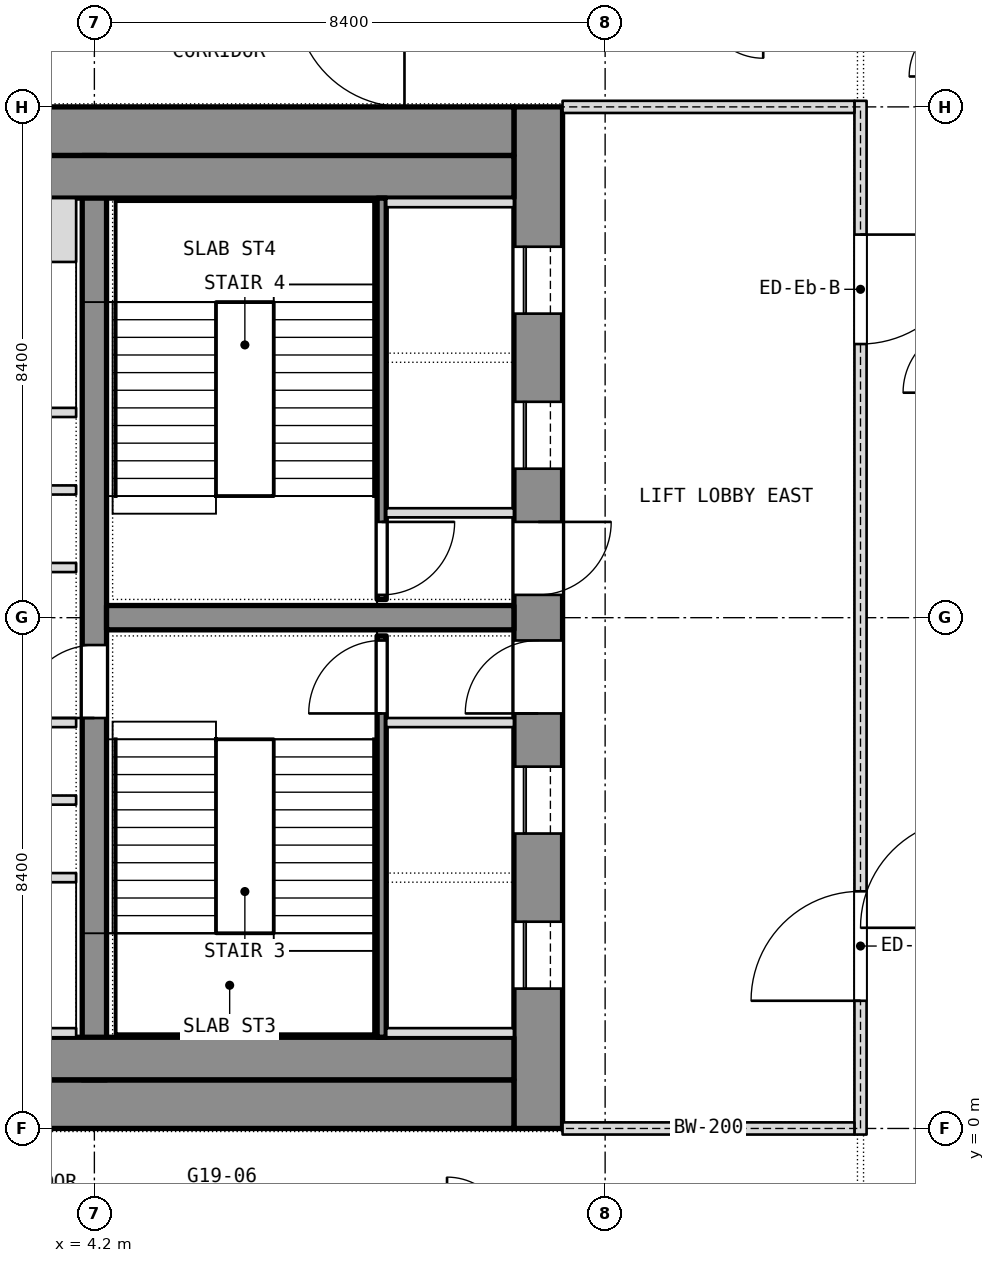
"""IFC4 building model, lengths in metres.
Left out: names, types, materials, properties, quantities, classifications, styles, units other than length and angle.
Written with IfcOpenShell. Run it as: python <this file> out.ifc"""

import sys

from ifc_helpers import new_model, si_unit, direction, frame, frame_2d, origin, place, context, subcontext, project, spatial, rectangle, extrude, element, fill, save


model = new_model("IFC4")
c1 = context("Model", 3, precision=1e-05, world=origin(), true_north=direction((0.0, 1.0)))
c2 = subcontext(c1, "Body", "Model", "MODEL_VIEW")
j1 = project(units=[si_unit("LENGTHUNIT", "METRE"), si_unit("PLANEANGLEUNIT", "RADIAN")], contexts=[c1])
p1 = place(None, origin())
s1 = spatial("IfcSite", under=j1, at=p1, CompositionType="ELEMENT")
p2 = place(p1, origin())
s2 = spatial("IfcBuilding", under=s1, at=p2, CompositionType="ELEMENT")
p3 = place(p2, frame((0.0, 0.0, 227.3)))
s3 = spatial("IfcBuildingStorey", under=s2, at=p3, CompositionType="ELEMENT", Elevation=227.3)
p4 = place(p3, frame((11.5, 0.0, 0.0), z_axis=(0.0, 0.0, 1.0), x_axis=(0.0, 1.0, 0.0)))
e1 = element("IfcWall", 1, at=p4, inside=s3, PredefinedType="SHEAR", context=c2, shape_type="SweptSolid", body=[
    extrude(rectangle(XDim=16.8, YDim=0.8, at=frame_2d((8.4, 0.0))), origin(), (0.0, 0.0, 1.0), 3.6),
])
p5 = place(p4, frame((2.3, 0.0, 0.0)))
e2 = element("IfcOpeningElement", 2, at=p5, cuts=e1, PredefinedType="OPENING", context=c2, shape_type="SweptSolid", body=[
    extrude(rectangle(XDim=1.1, YDim=2.1, at=frame_2d((0.55, 1.05))), frame((0.0, 0.4, 0.0), z_axis=(0.0, -1.0, 0.0), x_axis=(1.0, 0.0, 0.0)), (0.0, 0.0, 1.0), 0.8),
])
p6 = place(p4, frame((4.85, 0.0, 0.0)))
e3 = element("IfcOpeningElement", 3, at=p6, cuts=e1, PredefinedType="OPENING", context=c2, shape_type="SweptSolid", body=[
    extrude(rectangle(XDim=1.1, YDim=2.1, at=frame_2d((0.55, 1.05))), frame((0.0, 0.4, 0.0), z_axis=(0.0, -1.0, 0.0), x_axis=(1.0, 0.0, 0.0)), (0.0, 0.0, 1.0), 0.8),
])
p7 = place(p4, frame((6.825, 0.0, 0.0)))
e4 = element("IfcOpeningElement", 4, at=p7, cuts=e1, PredefinedType="OPENING", context=c2, shape_type="SweptSolid", body=[
    extrude(rectangle(XDim=1.2, YDim=2.1, at=frame_2d((0.6, 1.05))), frame((0.0, 0.4, 0.0), z_axis=(0.0, -1.0, 0.0), x_axis=(1.0, 0.0, 0.0)), (0.0, 0.0, 1.0), 0.8),
])
p8 = place(p4, frame((13.4, 0.0, 0.0)))
e5 = element("IfcOpeningElement", 5, at=p8, cuts=e1, PredefinedType="OPENING", context=c2, shape_type="SweptSolid", body=[
    extrude(rectangle(XDim=1.1, YDim=2.1, at=frame_2d((0.55, 1.05))), frame((0.0, 0.4, 0.0), z_axis=(0.0, -1.0, 0.0), x_axis=(1.0, 0.0, 0.0)), (0.0, 0.0, 1.0), 0.8),
])
p9 = place(p4, frame((10.85, 0.0, 0.0)))
e6 = element("IfcOpeningElement", 6, at=p9, cuts=e1, PredefinedType="OPENING", context=c2, shape_type="SweptSolid", body=[
    extrude(rectangle(XDim=1.1, YDim=2.1, at=frame_2d((0.55, 1.05))), frame((0.0, 0.4, 0.0), z_axis=(0.0, -1.0, 0.0), x_axis=(1.0, 0.0, 0.0)), (0.0, 0.0, 1.0), 0.8),
])
p10 = place(p4, frame((8.775, 0.0, 0.0)))
e7 = element("IfcOpeningElement", 7, at=p10, cuts=e1, PredefinedType="OPENING", context=c2, shape_type="SweptSolid", body=[
    extrude(rectangle(XDim=1.2, YDim=2.1, at=frame_2d((0.6, 1.05))), frame((0.0, 0.4, 0.0), z_axis=(0.0, -1.0, 0.0), x_axis=(1.0, 0.0, 0.0)), (0.0, 0.0, 1.0), 0.8),
])
for number, where, z_axis, x_axis in (
    (8, (-11.1, 0.4, 0.0), (0.0, 0.0, 1.0), (1.0, 0.0, 0.0)),
    (9, (-11.1, 16.4, 0.0), (0.0, 0.0, 1.0), (1.0, 0.0, 0.0)),
):
    element("IfcWall", number, at=place(p3, frame(where, z_axis=z_axis, x_axis=x_axis)), inside=s3, PredefinedType="SHEAR", context=c2, shape_type="SweptSolid", body=[
        extrude(rectangle(XDim=22.2, YDim=0.8, at=frame_2d((11.1, 0.0))), origin(), (0.0, 0.0, 1.0), 3.6),
    ])
p11 = place(p3, frame((4.2, 0.8, 0.0), z_axis=(0.0, 0.0, 1.0), x_axis=(0.0, 1.0, 0.0)))
e10 = element("IfcWall", 10, at=p11, inside=s3, PredefinedType="SHEAR", context=c2, shape_type="SweptSolid", body=[
    extrude(rectangle(XDim=15.2, YDim=0.4, at=frame_2d((7.6, 0.0))), origin(), (0.0, 0.0, 1.0), 3.6),
])
p12 = place(p11, frame((5.95, 0.0, 0.0)))
e11 = element("IfcOpeningElement", 11, at=p12, cuts=e10, PredefinedType="OPENING", context=c2, shape_type="SweptSolid", body=[
    extrude(rectangle(XDim=1.2, YDim=2.1, at=frame_2d((0.6, 1.05))), frame((0.0, 0.2, 0.0), z_axis=(0.0, -1.0, 0.0), x_axis=(1.0, 0.0, 0.0)), (0.0, 0.0, 1.0), 0.4),
])
p13 = place(p3, frame((4.4, 8.4, 0.0), z_axis=(0.0, 0.0, 1.0), x_axis=(1.0, 0.0, 0.0)))
e12 = element("IfcWall", 12, at=p13, inside=s3, PredefinedType="SHEAR", context=c2, shape_type="SweptSolid", body=[
    extrude(rectangle(XDim=6.7, YDim=0.4, at=frame_2d((3.35, 0.0))), origin(), (0.0, 0.0, 1.0), 3.6),
])
for number, where, z_axis, x_axis in (
    (13, (-11.1, 1.15, 0.0), (0.0, 0.0, 1.0), (1.0, 0.0, 0.0)),
    (14, (-11.1, 15.65, 0.0), (0.0, 0.0, 1.0), (1.0, 0.0, 0.0)),
):
    element("IfcWall", number, at=place(p3, frame(where, z_axis=z_axis, x_axis=x_axis)), inside=s3, PredefinedType="PARTITIONING", context=c2, shape_type="SweptSolid", body=[
        extrude(rectangle(XDim=22.2, YDim=0.7, at=frame_2d((11.1, 0.0))), origin(), (0.0, 0.0, 1.0), 3.34),
    ])
p14 = place(p3, frame((8.925, 1.5, 0.0), z_axis=(0.0, 0.0, 1.0), x_axis=(0.0, 1.0, 0.0)))
e15 = element("IfcWall", 15, at=p14, inside=s3, PredefinedType="SHEAR", context=c2, shape_type="SweptSolid", body=[
    extrude(rectangle(XDim=6.6, YDim=0.15, at=frame_2d((3.3, 0.0))), origin(), (0.0, 0.0, 1.0), 3.34),
])
p15 = place(p14, frame((5.325, 0.0, 0.0)))
e16 = element("IfcOpeningElement", 16, at=p15, cuts=e15, PredefinedType="OPENING", context=c2, shape_type="SweptSolid", body=[
    extrude(rectangle(XDim=1.2, YDim=2.1, at=frame_2d((0.6, 1.05))), frame((0.0, 0.075, 0.0), z_axis=(0.0, -1.0, 0.0), x_axis=(1.0, 0.0, 0.0)), (0.0, 0.0, 1.0), 0.15),
])
for number, where, z_axis, x_axis in (
    (17, (9.0, 6.675, 0.0), (0.0, 0.0, 1.0), (1.0, 0.0, 0.0)),
    (18, (9.0, 1.575, 0.0), (0.0, 0.0, 1.0), (1.0, 0.0, 0.0)),
):
    element("IfcWall", number, at=place(p3, frame(where, z_axis=z_axis, x_axis=x_axis)), inside=s3, PredefinedType="SHEAR", context=c2, shape_type="SweptSolid", body=[
        extrude(rectangle(XDim=2.1, YDim=0.15, at=frame_2d((1.05, 0.0))), origin(), (0.0, 0.0, 1.0), 3.6),
    ])
p16 = place(p3, frame((8.925, 8.7, 0.0), z_axis=(0.0, 0.0, 1.0), x_axis=(0.0, 1.0, 0.0)))
e19 = element("IfcWall", 19, at=p16, inside=s3, PredefinedType="SHEAR", context=c2, shape_type="SweptSolid", body=[
    extrude(rectangle(XDim=6.6, YDim=0.15, at=frame_2d((3.3, 0.0))), origin(), (0.0, 0.0, 1.0), 3.34),
])
p17 = place(p16, frame((0.075, 0.0, 0.0)))
e20 = element("IfcOpeningElement", 20, at=p17, cuts=e19, PredefinedType="OPENING", context=c2, shape_type="SweptSolid", body=[
    extrude(rectangle(XDim=1.2, YDim=2.1, at=frame_2d((0.6, 1.05))), frame((0.0, 0.075, 0.0), z_axis=(0.0, -1.0, 0.0), x_axis=(1.0, 0.0, 0.0)), (0.0, 0.0, 1.0), 0.15),
])
for number, where, z_axis, x_axis in (
    (21, (9.0, 10.125, 0.0), (0.0, 0.0, 1.0), (1.0, 0.0, 0.0)),
    (22, (9.0, 15.225, 0.0), (0.0, 0.0, 1.0), (1.0, 0.0, 0.0)),
):
    element("IfcWall", number, at=place(p3, frame(where, z_axis=z_axis, x_axis=x_axis)), inside=s3, PredefinedType="SHEAR", context=c2, shape_type="SweptSolid", body=[
        extrude(rectangle(XDim=2.1, YDim=0.15, at=frame_2d((1.05, 0.0))), origin(), (0.0, 0.0, 1.0), 3.6),
    ])
p18 = place(p3, frame((-3.9, 4.125, 0.0), z_axis=(0.0, 0.0, 1.0), x_axis=(1.0, 0.0, 0.0)))
e23 = element("IfcWall", 23, at=p18, inside=s3, PredefinedType="PARTITIONING", context=c2, shape_type="SweptSolid", body=[
    extrude(rectangle(XDim=7.8, YDim=0.15, at=frame_2d((3.9, 0.0))), origin(), (0.0, 0.0, 1.0), 3.34),
])
p19 = place(p18, frame((3.75, 0.0, 0.0)))
e24 = element("IfcOpeningElement", 24, at=p19, cuts=e23, PredefinedType="OPENING", context=c2, shape_type="SweptSolid", body=[
    extrude(rectangle(XDim=1.2, YDim=2.1, at=frame_2d((0.6, 1.05))), frame((0.0, 0.075, 0.0), z_axis=(0.0, -1.0, 0.0), x_axis=(1.0, 0.0, 0.0)), (0.0, 0.0, 1.0), 0.15),
])
p20 = place(p3, frame((-3.9, 11.775, 0.0), z_axis=(0.0, 0.0, 1.0), x_axis=(1.0, 0.0, 0.0)))
e25 = element("IfcWall", 25, at=p20, inside=s3, PredefinedType="PARTITIONING", context=c2, shape_type="SweptSolid", body=[
    extrude(rectangle(XDim=7.8, YDim=0.15, at=frame_2d((3.9, 0.0))), origin(), (0.0, 0.0, 1.0), 3.34),
])
p21 = place(p20, frame((3.3, 0.0, 0.0)))
e26 = element("IfcOpeningElement", 26, at=p21, cuts=e25, PredefinedType="OPENING", context=c2, shape_type="SweptSolid", body=[
    extrude(rectangle(XDim=1.2, YDim=2.1, at=frame_2d((0.6, 1.05))), frame((0.0, 0.075, 0.0), z_axis=(0.0, -1.0, 0.0), x_axis=(1.0, 0.0, 0.0)), (0.0, 0.0, 1.0), 0.15),
])
p22 = place(p3, frame((1.65, 1.575, 0.0), z_axis=(0.0, 0.0, 1.0), x_axis=(1.0, 0.0, 0.0)))
e27 = element("IfcWall", 27, at=p22, inside=s3, PredefinedType="SHEAR", context=c2, shape_type="SweptSolid", body=[
    extrude(rectangle(XDim=2.25, YDim=0.15, at=frame_2d((1.125, 0.0))), origin(), (0.0, 0.0, 1.0), 3.6),
])
p23 = place(p3, frame((1.65, 14.775, 0.0), z_axis=(0.0, 0.0, 1.0), x_axis=(1.0, 0.0, 0.0)))
e28 = element("IfcWall", 28, at=p23, inside=s3, PredefinedType="SHEAR", context=c2, shape_type="SweptSolid", body=[
    extrude(rectangle(XDim=2.25, YDim=1.05, at=frame_2d((1.125, 0.0))), origin(), (0.0, 0.0, 1.0), 3.6),
])
for number, where, z_axis, x_axis in (
    (29, (1.65, 6.675, 0.0), (0.0, 0.0, 1.0), (1.0, 0.0, 0.0)),
    (30, (1.65, 9.225, 0.0), (0.0, 0.0, 1.0), (1.0, 0.0, 0.0)),
):
    element("IfcWall", number, at=place(p3, frame(where, z_axis=z_axis, x_axis=x_axis)), inside=s3, PredefinedType="PARTITIONING", context=c2, shape_type="SweptSolid", body=[
        extrude(rectangle(XDim=2.25, YDim=0.15, at=frame_2d((1.125, 0.0))), origin(), (0.0, 0.0, 1.0), 3.34),
    ])
for number, where, z_axis, x_axis in (
    (31, (1.8, 5.4, 0.0), (0.0, 0.0, 1.0), (1.0, 0.0, 0.0)),
    (32, (1.8, 10.5, 0.0), (0.0, 0.0, 1.0), (1.0, 0.0, 0.0)),
):
    element("IfcWall", number, at=place(p3, frame(where, z_axis=z_axis, x_axis=x_axis)), inside=s3, PredefinedType="PARTITIONING", context=c2, shape_type="SweptSolid", body=[
        extrude(rectangle(XDim=2.1, YDim=0.15, at=frame_2d((1.05, 0.0))), origin(), (0.0, 0.0, 1.0), 3.34),
    ])
p24 = place(p3, frame((16.8, -0.1, 0.0), z_axis=(0.0, 0.0, 1.0), x_axis=(0.0, 1.0, 0.0)))
e33 = element("IfcWall", 33, at=p24, inside=s3, PredefinedType="PARTITIONING", context=c2, shape_type="SweptSolid", body=[
    extrude(rectangle(XDim=17.0, YDim=0.2, at=frame_2d((8.5, 0.0))), origin(), (0.0, 0.0, 1.0), 3.34),
])
p25 = place(p24, frame((2.2, 0.0, 0.0)))
e34 = element("IfcOpeningElement", 34, at=p25, cuts=e33, PredefinedType="OPENING", context=c2, shape_type="SweptSolid", body=[
    extrude(rectangle(XDim=1.8, YDim=2.1, at=frame_2d((0.9, 1.05))), frame((0.0, 0.1, 0.0), z_axis=(0.0, -1.0, 0.0), x_axis=(1.0, 0.0, 0.0)), (0.0, 0.0, 1.0), 0.2),
])
p26 = place(p24, frame((13.0, 0.0, 0.0)))
e35 = element("IfcOpeningElement", 35, at=p26, cuts=e33, PredefinedType="OPENING", context=c2, shape_type="SweptSolid", body=[
    extrude(rectangle(XDim=1.8, YDim=2.1, at=frame_2d((0.9, 1.05))), frame((0.0, 0.1, 0.0), z_axis=(0.0, -1.0, 0.0), x_axis=(1.0, 0.0, 0.0)), (0.0, 0.0, 1.0), 0.2),
])
for number, where, z_axis, x_axis in (
    (36, (11.9, 0.0, 0.0), (0.0, 0.0, 1.0), (1.0, 0.0, 0.0)),
    (37, (11.9, 16.8, 0.0), (0.0, 0.0, 1.0), (1.0, 0.0, 0.0)),
):
    element("IfcWall", number, at=place(p3, frame(where, z_axis=z_axis, x_axis=x_axis)), inside=s3, PredefinedType="PARTITIONING", context=c2, shape_type="SweptSolid", body=[
        extrude(rectangle(XDim=4.8, YDim=0.2, at=frame_2d((2.4, 0.0))), origin(), (0.0, 0.0, 1.0), 2.94),
    ])
p27 = place(p5, origin())
e38 = element("IfcDoor", 38, at=p27, inside=s3, OperationType="SLIDING_TO_LEFT", PredefinedType="DOOR", context=c2, shape_type="SweptSolid", body=[
    extrude(rectangle(XDim=1.1, YDim=2.1, at=frame_2d((0.55, 1.05))), frame((0.0, 0.025, 0.0), z_axis=(0.0, -1.0, 0.0), x_axis=(1.0, 0.0, 0.0)), (0.0, 0.0, 1.0), 0.05),
])
fill(e2, e38)
p28 = place(p6, origin())
e39 = element("IfcDoor", 39, at=p28, inside=s3, OperationType="SLIDING_TO_LEFT", PredefinedType="DOOR", context=c2, shape_type="SweptSolid", body=[
    extrude(rectangle(XDim=1.1, YDim=2.1, at=frame_2d((0.55, 1.05))), frame((0.0, 0.025, 0.0), z_axis=(0.0, -1.0, 0.0), x_axis=(1.0, 0.0, 0.0)), (0.0, 0.0, 1.0), 0.05),
])
fill(e3, e39)
p29 = place(p7, origin())
e40 = element("IfcDoor", 40, at=p29, inside=s3, OperationType="SINGLE_SWING_LEFT", PredefinedType="DOOR", context=c2, shape_type="SweptSolid", body=[
    extrude(rectangle(XDim=1.2, YDim=2.1, at=frame_2d((0.6, 1.05))), frame((0.0, 0.025, 0.0), z_axis=(0.0, -1.0, 0.0), x_axis=(1.0, 0.0, 0.0)), (0.0, 0.0, 1.0), 0.05),
])
fill(e4, e40)
p30 = place(p15, origin())
e41 = element("IfcDoor", 41, at=p30, inside=s3, OperationType="SINGLE_SWING_LEFT", PredefinedType="DOOR", context=c2, shape_type="SweptSolid", body=[
    extrude(rectangle(XDim=1.2, YDim=2.1, at=frame_2d((0.6, 1.05))), frame((0.0, 0.025, 0.0), z_axis=(0.0, -1.0, 0.0), x_axis=(1.0, 0.0, 0.0)), (0.0, 0.0, 1.0), 0.05),
])
fill(e16, e41)
p31 = place(p8, origin())
e42 = element("IfcDoor", 42, at=p31, inside=s3, OperationType="SLIDING_TO_LEFT", PredefinedType="DOOR", context=c2, shape_type="SweptSolid", body=[
    extrude(rectangle(XDim=1.1, YDim=2.1, at=frame_2d((0.55, 1.05))), frame((0.0, 0.025, 0.0), z_axis=(0.0, -1.0, 0.0), x_axis=(1.0, 0.0, 0.0)), (0.0, 0.0, 1.0), 0.05),
])
fill(e5, e42)
p32 = place(p9, origin())
e43 = element("IfcDoor", 43, at=p32, inside=s3, OperationType="SLIDING_TO_LEFT", PredefinedType="DOOR", context=c2, shape_type="SweptSolid", body=[
    extrude(rectangle(XDim=1.1, YDim=2.1, at=frame_2d((0.55, 1.05))), frame((0.0, 0.025, 0.0), z_axis=(0.0, -1.0, 0.0), x_axis=(1.0, 0.0, 0.0)), (0.0, 0.0, 1.0), 0.05),
])
fill(e6, e43)
p33 = place(p10, origin())
e44 = element("IfcDoor", 44, at=p33, inside=s3, OperationType="SINGLE_SWING_LEFT", PredefinedType="DOOR", context=c2, shape_type="SweptSolid", body=[
    extrude(rectangle(XDim=1.2, YDim=2.1, at=frame_2d((0.6, 1.05))), frame((0.0, 0.025, 0.0), z_axis=(0.0, -1.0, 0.0), x_axis=(1.0, 0.0, 0.0)), (0.0, 0.0, 1.0), 0.05),
])
fill(e7, e44)
p34 = place(p17, origin())
e45 = element("IfcDoor", 45, at=p34, inside=s3, OperationType="SINGLE_SWING_LEFT", PredefinedType="DOOR", context=c2, shape_type="SweptSolid", body=[
    extrude(rectangle(XDim=1.2, YDim=2.1, at=frame_2d((0.6, 1.05))), frame((0.0, 0.025, 0.0), z_axis=(0.0, -1.0, 0.0), x_axis=(1.0, 0.0, 0.0)), (0.0, 0.0, 1.0), 0.05),
])
fill(e20, e45)
p35 = place(p12, origin())
e46 = element("IfcDoor", 46, at=p35, inside=s3, OperationType="SINGLE_SWING_LEFT", PredefinedType="DOOR", context=c2, shape_type="SweptSolid", body=[
    extrude(rectangle(XDim=1.2, YDim=2.1, at=frame_2d((0.6, 1.05))), frame((0.0, 0.025, 0.0), z_axis=(0.0, -1.0, 0.0), x_axis=(1.0, 0.0, 0.0)), (0.0, 0.0, 1.0), 0.05),
])
fill(e11, e46)
p36 = place(p25, origin())
e47 = element("IfcDoor", 47, at=p36, inside=s3, OperationType="DOUBLE_DOOR_SINGLE_SWING", PredefinedType="DOOR", context=c2, shape_type="SweptSolid", body=[
    extrude(rectangle(XDim=1.8, YDim=2.1, at=frame_2d((0.9, 1.05))), frame((0.0, 0.025, 0.0), z_axis=(0.0, -1.0, 0.0), x_axis=(1.0, 0.0, 0.0)), (0.0, 0.0, 1.0), 0.05),
])
fill(e34, e47)
p37 = place(p26, origin())
e48 = element("IfcDoor", 48, at=p37, inside=s3, OperationType="DOUBLE_DOOR_SINGLE_SWING", PredefinedType="DOOR", context=c2, shape_type="SweptSolid", body=[
    extrude(rectangle(XDim=1.8, YDim=2.1, at=frame_2d((0.9, 1.05))), frame((0.0, 0.025, 0.0), z_axis=(0.0, -1.0, 0.0), x_axis=(1.0, 0.0, 0.0)), (0.0, 0.0, 1.0), 0.05),
])
fill(e35, e48)
save(model, sys.argv[1])
